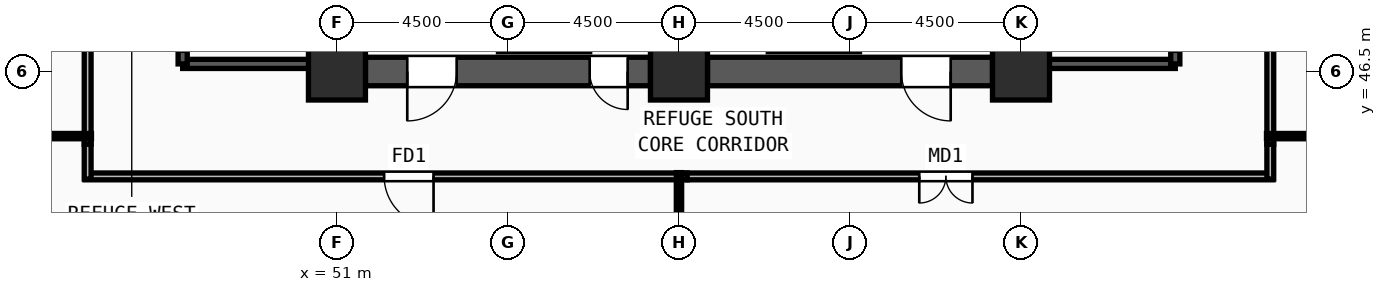
"""IFC4 building model, lengths in metres.
Left out: names, types, materials, properties, quantities, classifications, styles, units other than length and angle.
Written with IfcOpenShell. Run it as: python <this file> out.ifc"""

import sys

from ifc_helpers import new_model, si_unit, direction, frame, frame_2d, origin, origin_2d, place, context, subcontext, project, spatial, rectangle, extrude, source, transform, mapped, element, fill, save


model = new_model("IFC4")
c1 = context("Model", 3, precision=1e-05, world=origin(), true_north=direction((0.0, 1.0)))
c2 = subcontext(c1, "Body", "Model", "MODEL_VIEW")
j1 = project(units=[si_unit("LENGTHUNIT", "METRE"), si_unit("PLANEANGLEUNIT", "RADIAN")], contexts=[c1])
p1 = place(None, origin())
s1 = spatial("IfcSite", under=j1, at=p1, CompositionType="ELEMENT")
p2 = place(p1, origin())
s2 = spatial("IfcBuilding", under=s1, at=p2, CompositionType="ELEMENT")
p3 = place(p2, frame((0.0, 0.0, 185.25)))
s3 = spatial("IfcBuildingStorey", under=s2, at=p3, CompositionType="ELEMENT", Elevation=185.25)
m1 = source(origin(), c2, "Body", "SweptSolid", [
    extrude(rectangle(XDim=1.5, YDim=1.5, at=origin_2d()), origin(), (0.0, 0.0, 1.0), 4.5),
])
for number, where, z_axis, x_axis in (
    (1, (51.0, 46.5, 0.0), (0.0, 0.0, 1.0), (1.0, 0.0, 0.0)),
    (2, (60.0, 46.5, 0.0), (0.0, 0.0, 1.0), (1.0, 0.0, 0.0)),
    (3, (69.0, 46.5, 0.0), (0.0, 0.0, 1.0), (1.0, 0.0, 0.0)),
):
    element("IfcColumn", number, at=place(p3, frame(where, z_axis=z_axis, x_axis=x_axis)), inside=s3, PredefinedType="COLUMN", context=c2, shape_type="MappedRepresentation", body=[
        mapped(m1, transform((0.0, 0.0, 0.0), x_axis=(1.0, 0.0, 0.0), y_axis=(0.0, 1.0, 0.0), z_axis=(0.0, 0.0, 1.0), scale=1.0)),
    ])
p4 = place(p3, frame((68.25, 46.5, 0.0), z_axis=(0.0, 0.0, 1.0), x_axis=(-1.0, 0.0, 0.0)))
e4 = element("IfcWall", 4, at=p4, inside=s3, PredefinedType="SHEAR", context=c2, shape_type="SweptSolid", body=[
    extrude(rectangle(XDim=7.5, YDim=0.75, at=frame_2d((3.75, 0.0))), origin(), (0.0, 0.0, 1.0), 4.22),
])
m2 = source(origin(), c2, "Body", "SweptSolid", [
    extrude(rectangle(XDim=1.3, YDim=2.2, at=frame_2d((0.65, 1.1))), frame((0.0, 0.385, 0.0), z_axis=(0.0, -1.0, 0.0), x_axis=(1.0, 0.0, 0.0)), (0.0, 0.0, 1.0), 0.77),
])
p5 = place(p4, frame((1.1, 0.0, 0.0)))
e5 = element("IfcOpeningElement", 5, at=p5, cuts=e4, PredefinedType="OPENING", context=c2, shape_type="MappedRepresentation", body=[
    mapped(m2, transform((0.0, 0.0, 0.0), x_axis=(1.0, 0.0, 0.0), y_axis=(0.0, 1.0, 0.0), z_axis=(0.0, 0.0, 1.0), scale=1.0)),
])
p6 = place(p3, frame((59.25, 46.5, 0.0), z_axis=(0.0, 0.0, 1.0), x_axis=(-1.0, 0.0, 0.0)))
e6 = element("IfcWall", 6, at=p6, inside=s3, PredefinedType="SHEAR", context=c2, shape_type="SweptSolid", body=[
    extrude(rectangle(XDim=7.5, YDim=0.75, at=frame_2d((3.75, 0.0))), origin(), (0.0, 0.0, 1.0), 4.22),
])
p7 = place(p6, frame((5.1, 0.0, 0.0)))
e7 = element("IfcOpeningElement", 7, at=p7, cuts=e6, PredefinedType="OPENING", context=c2, shape_type="MappedRepresentation", body=[
    mapped(m2, transform((0.0, 0.0, 0.0), x_axis=(1.0, 0.0, 0.0), y_axis=(0.0, 1.0, 0.0), z_axis=(0.0, 0.0, 1.0), scale=1.0)),
])
m3 = source(origin(), c2, "Body", "SweptSolid", [
    extrude(rectangle(XDim=1.0, YDim=2.2, at=frame_2d((0.5, 1.1))), frame((0.0, 0.385, 0.0), z_axis=(0.0, -1.0, 0.0), x_axis=(1.0, 0.0, 0.0)), (0.0, 0.0, 1.0), 0.77),
])
p8 = place(p6, frame((0.6, 0.0, 0.0)))
e8 = element("IfcOpeningElement", 8, at=p8, cuts=e6, PredefinedType="OPENING", context=c2, shape_type="MappedRepresentation", body=[
    mapped(m3, transform((0.0, 0.0, 0.0), x_axis=(1.0, 0.0, 0.0), y_axis=(0.0, 1.0, 0.0), z_axis=(0.0, 0.0, 1.0), scale=1.0)),
])
p9 = place(p3, frame((46.94, 46.7, 0.0), z_axis=(0.0, 0.0, 1.0), x_axis=(1.0, 0.0, 0.0)))
e9 = element("IfcWall", 9, at=p9, inside=s3, PredefinedType="SOLIDWALL", context=c2, shape_type="SweptSolid", body=[
    extrude(rectangle(XDim=3.44, YDim=0.24, at=frame_2d((1.72, 0.0))), origin(), (0.0, 0.0, 1.0), 2.26),
])
p10 = place(p3, frame((50.38, 46.7, 0.0), z_axis=(0.0, 0.0, 1.0), x_axis=(0.0, 1.0, 0.0)))
e10 = element("IfcWall", 10, at=p10, inside=s3, PredefinedType="SOLIDWALL", context=c2, shape_type="SweptSolid", body=[
    extrude(rectangle(XDim=7.82, YDim=0.24, at=frame_2d((3.91, 0.0))), origin(), (0.0, 0.0, 1.0), 4.22),
])
p11 = place(p3, frame((46.94, 54.52, 0.0), z_axis=(0.0, 0.0, 1.0), x_axis=(0.0, -1.0, 0.0)))
e11 = element("IfcWall", 11, at=p11, inside=s3, PredefinedType="SOLIDWALL", context=c2, shape_type="SweptSolid", body=[
    extrude(rectangle(XDim=7.82, YDim=0.24, at=frame_2d((3.91, 0.0))), origin(), (0.0, 0.0, 1.0), 4.22),
])
m4 = source(origin(), c2, "Body", "SweptSolid", [
    extrude(rectangle(XDim=1.2, YDim=2.2, at=frame_2d((0.6, 1.1))), frame((0.0, 0.13, 0.0), z_axis=(0.0, -1.0, 0.0), x_axis=(1.0, 0.0, 0.0)), (0.0, 0.0, 1.0), 0.26),
])
p12 = place(p11, frame((6.3, 0.0, 0.0)))
e12 = element("IfcOpeningElement", 12, at=p12, cuts=e11, PredefinedType="OPENING", context=c2, shape_type="MappedRepresentation", body=[
    mapped(m4, transform((0.0, 0.0, 0.0), x_axis=(1.0, 0.0, 0.0), y_axis=(0.0, 1.0, 0.0), z_axis=(0.0, 0.0, 1.0), scale=1.0)),
])
p13 = place(p3, frame((69.62, 46.7, 0.0), z_axis=(0.0, 0.0, 1.0), x_axis=(1.0, 0.0, 0.0)))
e13 = element("IfcWall", 13, at=p13, inside=s3, PredefinedType="SOLIDWALL", context=c2, shape_type="SweptSolid", body=[
    extrude(rectangle(XDim=3.44, YDim=0.24, at=frame_2d((1.72, 0.0))), origin(), (0.0, 0.0, 1.0), 4.22),
])
p14 = place(p3, frame((73.06, 46.7, 0.0), z_axis=(0.0, 0.0, 1.0), x_axis=(0.0, 1.0, 0.0)))
e14 = element("IfcWall", 14, at=p14, inside=s3, PredefinedType="SOLIDWALL", context=c2, shape_type="SweptSolid", body=[
    extrude(rectangle(XDim=7.82, YDim=0.24, at=frame_2d((3.91, 0.0))), origin(), (0.0, 0.0, 1.0), 4.22),
])
p15 = place(p14, frame((0.32, 0.0, 0.0)))
e15 = element("IfcOpeningElement", 15, at=p15, cuts=e14, PredefinedType="OPENING", context=c2, shape_type="MappedRepresentation", body=[
    mapped(m4, transform((0.0, 0.0, 0.0), x_axis=(1.0, 0.0, 0.0), y_axis=(0.0, 1.0, 0.0), z_axis=(0.0, 0.0, 1.0), scale=1.0)),
])
p16 = place(p3, frame((69.62, 54.52, 0.0), z_axis=(0.0, 0.0, 1.0), x_axis=(0.0, -1.0, 0.0)))
e16 = element("IfcWall", 16, at=p16, inside=s3, PredefinedType="SOLIDWALL", context=c2, shape_type="SweptSolid", body=[
    extrude(rectangle(XDim=7.82, YDim=0.24, at=frame_2d((3.91, 0.0))), origin(), (0.0, 0.0, 1.0), 4.22),
])
p17 = place(p3, frame((75.56, 67.015, 0.0), z_axis=(0.0, 0.0, 1.0), x_axis=(0.0, -1.0, 0.0)))
e17 = element("IfcWall", 17, at=p17, inside=s3, PredefinedType="PARTITIONING", context=c2, shape_type="SweptSolid", body=[
    extrude(rectangle(XDim=22.43, YDim=0.18, at=frame_2d((11.215, 0.0))), origin(), (0.0, 0.0, 1.0), 3.805),
])
m5 = source(origin(), c2, "Body", "SweptSolid", [
    extrude(rectangle(XDim=1.3, YDim=2.2, at=frame_2d((0.65, 1.1))), frame((0.0, 0.1, 0.0), z_axis=(0.0, -1.0, 0.0), x_axis=(1.0, 0.0, 0.0)), (0.0, 0.0, 1.0), 0.2),
])
p18 = place(p17, frame((10.565, 0.0, 0.0)))
e18 = element("IfcOpeningElement", 18, at=p18, cuts=e17, PredefinedType="OPENING", context=c2, shape_type="MappedRepresentation", body=[
    mapped(m5, transform((0.0, 0.0, 0.0), x_axis=(1.0, 0.0, 0.0), y_axis=(0.0, 1.0, 0.0), z_axis=(0.0, 0.0, 1.0), scale=1.0)),
])
p19 = place(p3, frame((60.215, 43.74, 0.0), z_axis=(0.0, 0.0, 1.0), x_axis=(-1.0, 0.0, 0.0)))
e19 = element("IfcWall", 19, at=p19, inside=s3, PredefinedType="PARTITIONING", context=c2, shape_type="SweptSolid", body=[
    extrude(rectangle(XDim=15.845, YDim=0.18, at=frame_2d((7.922, 0.0))), origin(), (0.0, 0.0, 1.0), 4.22),
])
p20 = place(p19, frame((6.673, 0.0, 0.0)))
e20 = element("IfcOpeningElement", 20, at=p20, cuts=e19, PredefinedType="OPENING", context=c2, shape_type="MappedRepresentation", body=[
    mapped(m5, transform((0.0, 0.0, 0.0), x_axis=(1.0, 0.0, 0.0), y_axis=(0.0, 1.0, 0.0), z_axis=(0.0, 0.0, 1.0), scale=1.0)),
])
p21 = place(p3, frame((75.63, 43.74, 0.0), z_axis=(0.0, 0.0, 1.0), x_axis=(-1.0, 0.0, 0.0)))
e21 = element("IfcWall", 21, at=p21, inside=s3, PredefinedType="PARTITIONING", context=c2, shape_type="SweptSolid", body=[
    extrude(rectangle(XDim=15.415, YDim=0.18, at=frame_2d((7.708, 0.0))), origin(), (0.0, 0.0, 1.0), 4.22),
])
m6 = source(origin(), c2, "Body", "SweptSolid", [
    extrude(rectangle(XDim=1.4, YDim=2.25, at=frame_2d((0.7, 1.125))), frame((0.0, 0.1, 0.0), z_axis=(0.0, -1.0, 0.0), x_axis=(1.0, 0.0, 0.0)), (0.0, 0.0, 1.0), 0.2),
])
p22 = place(p21, frame((7.907, 0.0, 0.0)))
e22 = element("IfcOpeningElement", 22, at=p22, cuts=e21, PredefinedType="OPENING", context=c2, shape_type="MappedRepresentation", body=[
    mapped(m6, transform((0.0, 0.0, 0.0), x_axis=(1.0, 0.0, 0.0), y_axis=(0.0, 1.0, 0.0), z_axis=(0.0, 0.0, 1.0), scale=1.0)),
])
p23 = place(p3, frame((44.44, 44.585, 0.0), z_axis=(0.0, 0.0, 1.0), x_axis=(0.0, 1.0, 0.0)))
e23 = element("IfcWall", 23, at=p23, inside=s3, PredefinedType="PARTITIONING", context=c2, shape_type="SweptSolid", body=[
    extrude(rectangle(XDim=2.755, YDim=0.18, at=frame_2d((1.377, 0.0))), origin(), (0.0, 0.0, 1.0), 4.22),
])
for number, where, z_axis, x_axis in (
    (24, (44.44, 43.67, 0.0), (0.0, 0.0, 1.0), (0.0, 1.0, 0.0)),
    (25, (75.56, 44.585, 0.0), (0.0, 0.0, 1.0), (0.0, -1.0, 0.0)),
):
    element("IfcWall", number, at=place(p3, frame(where, z_axis=z_axis, x_axis=x_axis)), inside=s3, PredefinedType="PARTITIONING", context=c2, shape_type="SweptSolid", body=[
        extrude(rectangle(XDim=0.915, YDim=0.18, at=frame_2d((0.458, 0.0))), origin(), (0.0, 0.0, 1.0), 4.22),
    ])
p24 = place(p3, frame((44.54, 44.8, 0.0), z_axis=(0.0, 0.0, 1.0), x_axis=(-1.0, 0.0, 0.0)))
e26 = element("IfcWall", 26, at=p24, inside=s3, PredefinedType="PARTITIONING", context=c2, shape_type="SweptSolid", body=[
    extrude(rectangle(XDim=8.4, YDim=0.14, at=frame_2d((4.2, 0.0))), origin(), (0.0, 0.0, 1.0), 2.26),
])
p25 = place(p3, frame((75.46, 44.8, 0.0), z_axis=(0.0, 0.0, 1.0), x_axis=(1.0, 0.0, 0.0)))
e27 = element("IfcWall", 27, at=p25, inside=s3, PredefinedType="PARTITIONING", context=c2, shape_type="SweptSolid", body=[
    extrude(rectangle(XDim=8.739, YDim=0.14, at=frame_2d((4.37, 0.0))), origin(), (0.0, 0.0, 1.0), 4.22),
])
p26 = place(p3, frame((60.0, 43.84, 0.0), z_axis=(0.0, 0.0, 1.0), x_axis=(0.0, -1.0, 0.0)))
e28 = element("IfcWall", 28, at=p26, inside=s3, PredefinedType="PARTITIONING", context=c2, shape_type="SweptSolid", body=[
    extrude(rectangle(XDim=25.622, YDim=0.14, at=frame_2d((12.811, 0.0))), origin(), (0.0, 0.0, 1.0), 4.22),
])
m7 = source(origin(), c2, "Body", "SweptSolid", [
    extrude(rectangle(XDim=1.3, YDim=2.2, at=frame_2d((0.65, 1.1))), frame((0.0, 0.025, 0.0), z_axis=(0.0, -1.0, 0.0), x_axis=(1.0, 0.0, 0.0)), (0.0, 0.0, 1.0), 0.05),
])
p27 = place(p7, origin())
e29 = element("IfcDoor", 29, at=p27, inside=s3, OperationType="SINGLE_SWING_RIGHT", PredefinedType="DOOR", context=c2, shape_type="MappedRepresentation", body=[
    mapped(m7, transform((0.0, 0.0, 0.0), x_axis=(1.0, 0.0, 0.0), y_axis=(0.0, 1.0, 0.0), z_axis=(0.0, 0.0, 1.0), scale=1.0)),
])
fill(e7, e29)
m8 = source(origin(), c2, "Body", "SweptSolid", [
    extrude(rectangle(XDim=1.0, YDim=2.2, at=frame_2d((0.5, 1.1))), frame((0.0, 0.025, 0.0), z_axis=(0.0, -1.0, 0.0), x_axis=(1.0, 0.0, 0.0)), (0.0, 0.0, 1.0), 0.05),
])
p28 = place(p8, origin())
e30 = element("IfcDoor", 30, at=p28, inside=s3, OperationType="SINGLE_SWING_LEFT", PredefinedType="DOOR", context=c2, shape_type="MappedRepresentation", body=[
    mapped(m8, transform((0.0, 0.0, 0.0), x_axis=(1.0, 0.0, 0.0), y_axis=(0.0, 1.0, 0.0), z_axis=(0.0, 0.0, 1.0), scale=1.0)),
])
fill(e8, e30)
p29 = place(p5, origin())
e31 = element("IfcDoor", 31, at=p29, inside=s3, OperationType="SINGLE_SWING_LEFT", PredefinedType="DOOR", context=c2, shape_type="MappedRepresentation", body=[
    mapped(m7, transform((0.0, 0.0, 0.0), x_axis=(1.0, 0.0, 0.0), y_axis=(0.0, 1.0, 0.0), z_axis=(0.0, 0.0, 1.0), scale=1.0)),
])
fill(e5, e31)
p30 = place(p20, origin())
e32 = element("IfcDoor", 32, at=p30, inside=s3, OperationType="SINGLE_SWING_LEFT", PredefinedType="DOOR", context=c2, shape_type="MappedRepresentation", body=[
    mapped(m7, transform((0.0, 0.0, 0.0), x_axis=(1.0, 0.0, 0.0), y_axis=(0.0, 1.0, 0.0), z_axis=(0.0, 0.0, 1.0), scale=1.0)),
])
fill(e20, e32)
m9 = source(origin(), c2, "Body", "SweptSolid", [
    extrude(rectangle(XDim=1.4, YDim=2.25, at=frame_2d((0.7, 1.125))), frame((0.0, 0.025, 0.0), z_axis=(0.0, -1.0, 0.0), x_axis=(1.0, 0.0, 0.0)), (0.0, 0.0, 1.0), 0.05),
])
p31 = place(p22, origin())
e33 = element("IfcDoor", 33, at=p31, inside=s3, OperationType="DOUBLE_DOOR_SINGLE_SWING", PredefinedType="DOOR", context=c2, shape_type="MappedRepresentation", body=[
    mapped(m9, transform((0.0, 0.0, 0.0), x_axis=(1.0, 0.0, 0.0), y_axis=(0.0, 1.0, 0.0), z_axis=(0.0, 0.0, 1.0), scale=1.0)),
])
fill(e22, e33)
save(model, sys.argv[1])
